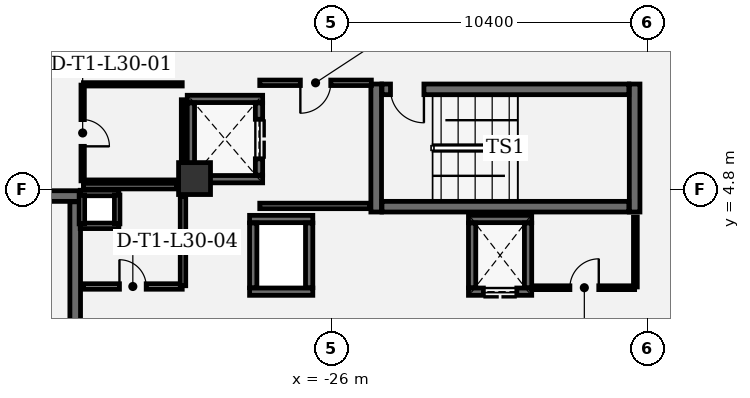
"""IFC4 building model, lengths in metres.
Left out: names, types, materials, properties, quantities, classifications, styles, units other than length and angle.
Written with IfcOpenShell. Run it as: python <this file> out.ifc"""

import sys

from ifc_helpers import new_model, si_unit, direction, frame, frame_2d, origin, origin_2d, place, context, subcontext, project, spatial, rectangle, extrude, element, fill, save


model = new_model("IFC4")
c1 = context("Model", 3, precision=1e-05, world=origin(), true_north=direction((0.0, 1.0)))
c2 = subcontext(c1, "Body", "Model", "MODEL_VIEW")
j1 = project(units=[si_unit("LENGTHUNIT", "METRE"), si_unit("PLANEANGLEUNIT", "RADIAN")], contexts=[c1])
p1 = place(None, origin())
s1 = spatial("IfcSite", under=j1, at=p1, CompositionType="ELEMENT")
p2 = place(p1, origin())
s2 = spatial("IfcBuilding", under=s1, at=p2, CompositionType="ELEMENT")
p3 = place(p2, frame((0.0, 0.0, 134.1)))
s3 = spatial("IfcBuildingStorey", under=s2, at=p3, CompositionType="ELEMENT", Elevation=134.1)
p4 = place(p3, frame((-30.5, 5.15, 0.0), z_axis=(0.0, 0.0, 1.0), x_axis=(1.0, 0.0, 0.0)))
e1 = element("IfcColumn", 1, at=p4, inside=s3, PredefinedType="COLUMN", context=c2, shape_type="SweptSolid", body=[
    extrude(rectangle(XDim=1.05, YDim=1.05, at=origin_2d()), origin(), (0.0, 0.0, 1.0), 4.05),
])
for number, where, z_axis, x_axis in (
    (2, (-24.525, 8.26, 0.0), (0.0, 0.0, 1.0), (0.0, -1.0, 0.0)),
    (3, (-16.025, 4.05, 0.0), (0.0, 0.0, 1.0), (0.0, 1.0, 0.0)),
):
    element("IfcWall", number, at=place(p3, frame(where, z_axis=z_axis, x_axis=x_axis)), inside=s3, PredefinedType="SHEAR", context=c2, shape_type="SweptSolid", body=[
        extrude(rectangle(XDim=4.21, YDim=0.35, at=frame_2d((2.105, 0.0))), origin(), (0.0, 0.0, 1.0), 3.78),
    ])
p5 = place(p3, frame((-24.335, 4.225, 0.0), z_axis=(0.0, 0.0, 1.0), x_axis=(1.0, 0.0, 0.0)))
e4 = element("IfcWall", 4, at=p5, inside=s3, PredefinedType="SHEAR", context=c2, shape_type="SweptSolid", body=[
    extrude(rectangle(XDim=8.12, YDim=0.35, at=frame_2d((4.06, 0.0))), origin(), (0.0, 0.0, 1.0), 3.78),
])
p6 = place(p3, frame((-16.215, 8.085, 0.0), z_axis=(0.0, 0.0, 1.0), x_axis=(-1.0, 0.0, 0.0)))
e5 = element("IfcWall", 5, at=p6, inside=s3, PredefinedType="SHEAR", context=c2, shape_type="SweptSolid", body=[
    extrude(rectangle(XDim=8.12, YDim=0.35, at=frame_2d((4.06, 0.0))), origin(), (0.0, 0.0, 1.0), 3.78),
])
p7 = place(p6, frame((6.74, 0.0, 0.0)))
e6 = element("IfcOpeningElement", 6, at=p7, cuts=e5, PredefinedType="OPENING", context=c2, shape_type="SweptSolid", body=[
    extrude(rectangle(XDim=1.1, YDim=2.2, at=frame_2d((0.55, 1.1))), frame((0.0, 0.185, 0.0), z_axis=(0.0, -1.0, 0.0), x_axis=(1.0, 0.0, 0.0)), (0.0, 0.0, 1.0), 0.37),
])
p8 = place(p3, frame((-34.25, 4.575, 0.0), z_axis=(0.0, 0.0, 1.0), x_axis=(-1.0, 0.0, 0.0)))
e7 = element("IfcWall", 7, at=p8, inside=s3, PredefinedType="SHEAR", context=c2, shape_type="SweptSolid", body=[
    extrude(rectangle(XDim=4.21, YDim=0.35, at=frame_2d((2.105, 0.0))), origin(), (0.0, 0.0, 1.0), 3.78),
])
p9 = place(p3, frame((-34.425, -4.385, 0.0), z_axis=(0.0, 0.0, 1.0), x_axis=(0.0, 1.0, 0.0)))
e8 = element("IfcWall", 8, at=p9, inside=s3, PredefinedType="SHEAR", context=c2, shape_type="SweptSolid", body=[
    extrude(rectangle(XDim=8.77, YDim=0.35, at=frame_2d((4.385, 0.0))), origin(), (0.0, 0.0, 1.0), 3.78),
])
for number, where, z_axis, x_axis in (
    (9, (-28.26, 5.13, 0.0), (0.0, 0.0, 1.0), (-1.0, 0.0, 0.0)),
    (10, (-30.74, 7.77, 0.0), (0.0, 0.0, 1.0), (1.0, 0.0, 0.0)),
):
    element("IfcWall", number, at=place(p3, frame(where, z_axis=z_axis, x_axis=x_axis)), inside=s3, PredefinedType="SHEAR", context=c2, shape_type="SweptSolid", body=[
        extrude(rectangle(XDim=2.48, YDim=0.24, at=frame_2d((1.24, 0.0))), origin(), (0.0, 0.0, 1.0), 3.78),
    ])
p10 = place(p3, frame((-30.62, 5.262, 0.0), z_axis=(0.0, 0.0, 1.0), x_axis=(0.0, 1.0, 0.0)))
e11 = element("IfcWall", 11, at=p10, inside=s3, PredefinedType="SHEAR", context=c2, shape_type="SweptSolid", body=[
    extrude(rectangle(XDim=2.376, YDim=0.24, at=frame_2d((1.188, 0.0))), origin(), (0.0, 0.0, 1.0), 3.78),
])
p11 = place(p3, frame((-28.38, 7.638, 0.0), z_axis=(0.0, 0.0, 1.0), x_axis=(0.0, -1.0, 0.0)))
e12 = element("IfcWall", 12, at=p11, inside=s3, PredefinedType="SHEAR", context=c2, shape_type="SweptSolid", body=[
    extrude(rectangle(XDim=2.376, YDim=0.24, at=frame_2d((1.188, 0.0))), origin(), (0.0, 0.0, 1.0), 3.78),
])
p12 = place(p11, frame((0.538, 0.0, 0.0)))
e13 = element("IfcOpeningElement", 13, at=p12, cuts=e12, PredefinedType="OPENING", context=c2, shape_type="SweptSolid", body=[
    extrude(rectangle(XDim=1.3, YDim=2.3, at=frame_2d((0.65, 1.15))), frame((0.0, 0.13, 0.0), z_axis=(0.0, -1.0, 0.0), x_axis=(1.0, 0.0, 0.0)), (0.0, 0.0, 1.0), 0.26),
])
for number, where, z_axis, x_axis in (
    (14, (-26.61, 1.43, 0.0), (0.0, 0.0, 1.0), (-1.0, 0.0, 0.0)),
    (15, (-28.69, 3.82, 0.0), (0.0, 0.0, 1.0), (1.0, 0.0, 0.0)),
):
    element("IfcWall", number, at=place(p3, frame(where, z_axis=z_axis, x_axis=x_axis)), inside=s3, PredefinedType="SHEAR", context=c2, shape_type="SweptSolid", body=[
        extrude(rectangle(XDim=2.08, YDim=0.24, at=frame_2d((1.04, 0.0))), origin(), (0.0, 0.0, 1.0), 3.78),
    ])
for number, where, z_axis, x_axis in (
    (16, (-28.57, 1.562, 0.0), (0.0, 0.0, 1.0), (0.0, 1.0, 0.0)),
    (17, (-26.73, 3.688, 0.0), (0.0, 0.0, 1.0), (0.0, -1.0, 0.0)),
):
    element("IfcWall", number, at=place(p3, frame(where, z_axis=z_axis, x_axis=x_axis)), inside=s3, PredefinedType="SHEAR", context=c2, shape_type="SweptSolid", body=[
        extrude(rectangle(XDim=2.126, YDim=0.24, at=frame_2d((1.063, 0.0))), origin(), (0.0, 0.0, 1.0), 3.78),
    ])
p13 = place(p3, frame((-19.41, 1.43, 0.0), z_axis=(0.0, 0.0, 1.0), x_axis=(-1.0, 0.0, 0.0)))
e18 = element("IfcWall", 18, at=p13, inside=s3, PredefinedType="SHEAR", context=c2, shape_type="SweptSolid", body=[
    extrude(rectangle(XDim=2.08, YDim=0.24, at=frame_2d((1.04, 0.0))), origin(), (0.0, 0.0, 1.0), 3.78),
])
p14 = place(p13, frame((0.49, 0.0, 0.0)))
e19 = element("IfcOpeningElement", 19, at=p14, cuts=e18, PredefinedType="OPENING", context=c2, shape_type="SweptSolid", body=[
    extrude(rectangle(XDim=1.1, YDim=2.2, at=frame_2d((0.55, 1.1))), frame((0.0, 0.13, 0.0), z_axis=(0.0, -1.0, 0.0), x_axis=(1.0, 0.0, 0.0)), (0.0, 0.0, 1.0), 0.26),
])
p15 = place(p3, frame((-21.49, 3.82, 0.0), z_axis=(0.0, 0.0, 1.0), x_axis=(1.0, 0.0, 0.0)))
e20 = element("IfcWall", 20, at=p15, inside=s3, PredefinedType="SHEAR", context=c2, shape_type="SweptSolid", body=[
    extrude(rectangle(XDim=2.08, YDim=0.24, at=frame_2d((1.04, 0.0))), origin(), (0.0, 0.0, 1.0), 3.78),
])
for number, where, z_axis, x_axis in (
    (21, (-21.37, 1.562, 0.0), (0.0, 0.0, 1.0), (0.0, 1.0, 0.0)),
    (22, (-19.53, 3.688, 0.0), (0.0, 0.0, 1.0), (0.0, -1.0, 0.0)),
):
    element("IfcWall", number, at=place(p3, frame(where, z_axis=z_axis, x_axis=x_axis)), inside=s3, PredefinedType="SHEAR", context=c2, shape_type="SweptSolid", body=[
        extrude(rectangle(XDim=2.126, YDim=0.24, at=frame_2d((1.063, 0.0))), origin(), (0.0, 0.0, 1.0), 3.78),
    ])
for number, where, z_axis, x_axis in (
    (23, (-32.99, 3.595, 0.0), (0.0, 0.0, 1.0), (-1.0, 0.0, 0.0)),
    (24, (-34.26, 4.675, 0.0), (0.0, 0.0, 1.0), (1.0, 0.0, 0.0)),
):
    element("IfcWall", number, at=place(p3, frame(where, z_axis=z_axis, x_axis=x_axis)), inside=s3, PredefinedType="PARTITIONING", context=c2, shape_type="SweptSolid", body=[
        extrude(rectangle(XDim=1.27, YDim=0.18, at=frame_2d((0.635, 0.0))), origin(), (0.0, 0.0, 1.0), 3.78),
    ])
for number, where, z_axis, x_axis in (
    (25, (-34.205, 3.66, 0.0), (0.0, 0.0, 1.0), (0.0, 1.0, 0.0)),
    (26, (-33.045, 4.61, 0.0), (0.0, 0.0, 1.0), (0.0, -1.0, 0.0)),
):
    element("IfcWall", number, at=place(p3, frame(where, z_axis=z_axis, x_axis=x_axis)), inside=s3, PredefinedType="PARTITIONING", context=c2, shape_type="SweptSolid", body=[
        extrude(rectangle(XDim=0.95, YDim=0.18, at=frame_2d((0.475, 0.0))), origin(), (0.0, 0.0, 1.0), 3.78),
    ])
p16 = place(p3, frame((-28.355, 4.25, 0.0), z_axis=(0.0, 0.0, 1.0), x_axis=(1.0, 0.0, 0.0)))
e27 = element("IfcWall", 27, at=p16, inside=s3, PredefinedType="PARTITIONING", context=c2, shape_type="SweptSolid", body=[
    extrude(rectangle(XDim=3.622, YDim=0.18, at=frame_2d((1.811, 0.0))), origin(), (0.0, 0.0, 1.0), 3.78),
])
p17 = place(p3, frame((-24.684, 8.3, 0.0), z_axis=(0.0, 0.0, 1.0), x_axis=(-1.0, 0.0, 0.0)))
e28 = element("IfcWall", 28, at=p17, inside=s3, PredefinedType="PARTITIONING", context=c2, shape_type="SweptSolid", body=[
    extrude(rectangle(XDim=3.671, YDim=0.18, at=frame_2d((1.835, 0.0))), origin(), (0.0, 0.0, 1.0), 3.78),
])
p18 = place(p17, frame((1.335, 0.0, 0.0)))
e29 = element("IfcOpeningElement", 29, at=p18, cuts=e28, PredefinedType="OPENING", context=c2, shape_type="SweptSolid", body=[
    extrude(rectangle(XDim=1.0, YDim=2.15, at=frame_2d((0.5, 1.075))), frame((0.0, 0.1, 0.0), z_axis=(0.0, -1.0, 0.0), x_axis=(1.0, 0.0, 0.0)), (0.0, 0.0, 1.0), 0.2),
])
p19 = place(p3, frame((-34.18, 8.225, 0.0), z_axis=(0.0, 0.0, 1.0), x_axis=(0.0, -1.0, 0.0)))
e30 = element("IfcWall", 30, at=p19, inside=s3, PredefinedType="PARTITIONING", context=c2, shape_type="SweptSolid", body=[
    extrude(rectangle(XDim=3.15, YDim=0.11, at=frame_2d((1.575, 0.0))), origin(), (0.0, 0.0, 1.0), 3.78),
])
p20 = place(p19, frame((1.135, 0.0, 0.0)))
e31 = element("IfcOpeningElement", 31, at=p20, cuts=e30, PredefinedType="OPENING", context=c2, shape_type="SweptSolid", body=[
    extrude(rectangle(XDim=0.88, YDim=2.1, at=frame_2d((0.44, 1.05))), frame((0.0, 0.065, 0.0), z_axis=(0.0, -1.0, 0.0), x_axis=(1.0, 0.0, 0.0)), (0.0, 0.0, 1.0), 0.13),
])
p21 = place(p3, frame((-34.155, 5.05, 0.0), z_axis=(0.0, 0.0, 1.0), x_axis=(1.0, 0.0, 0.0)))
e32 = element("IfcWall", 32, at=p21, inside=s3, PredefinedType="PARTITIONING", context=c2, shape_type="SweptSolid", body=[
    extrude(rectangle(XDim=3.065, YDim=0.11, at=frame_2d((1.532, 0.0))), origin(), (0.0, 0.0, 1.0), 3.78),
])
p22 = place(p3, frame((-30.88, 5.74, 0.0), z_axis=(0.0, 0.0, 1.0), x_axis=(0.0, 1.0, 0.0)))
e33 = element("IfcWall", 33, at=p22, inside=s3, PredefinedType="PARTITIONING", context=c2, shape_type="SweptSolid", body=[
    extrude(rectangle(XDim=2.003, YDim=0.11, at=frame_2d((1.001, 0.0))), origin(), (0.0, 0.0, 1.0), 3.78),
])
p23 = place(p3, frame((-30.905, 8.25, 0.0), z_axis=(0.0, 0.0, 1.0), x_axis=(-1.0, 0.0, 0.0)))
e34 = element("IfcWall", 34, at=p23, inside=s3, PredefinedType="PARTITIONING", context=c2, shape_type="SweptSolid", body=[
    extrude(rectangle(XDim=3.25, YDim=0.11, at=frame_2d((1.625, 0.0))), origin(), (0.0, 0.0, 1.0), 3.78),
])
p24 = place(p3, frame((-19.334, 1.56, 0.0), z_axis=(0.0, 0.0, 1.0), x_axis=(1.0, 0.0, 0.0)))
e35 = element("IfcWall", 35, at=p24, inside=s3, PredefinedType="PARTITIONING", context=c2, shape_type="SweptSolid", body=[
    extrude(rectangle(XDim=3.309, YDim=0.125, at=frame_2d((1.654, 0.0))), origin(), (0.0, 0.0, 1.0), 3.78),
])
p25 = place(p24, frame((1.179, 0.0, 0.0)))
e36 = element("IfcOpeningElement", 36, at=p25, cuts=e35, PredefinedType="OPENING", context=c2, shape_type="SweptSolid", body=[
    extrude(rectangle(XDim=0.95, YDim=2.15, at=frame_2d((0.475, 1.075))), frame((0.0, 0.073, 0.0), z_axis=(0.0, -1.0, 0.0), x_axis=(1.0, 0.0, 0.0)), (0.0, 0.0, 1.0), 0.145),
])
p26 = place(p3, frame((-16.0, 1.585, 0.0), z_axis=(0.0, 0.0, 1.0), x_axis=(0.0, 1.0, 0.0)))
e37 = element("IfcWall", 37, at=p26, inside=s3, PredefinedType="PARTITIONING", context=c2, shape_type="SweptSolid", body=[
    extrude(rectangle(XDim=2.302, YDim=0.125, at=frame_2d((1.151, 0.0))), origin(), (0.0, 0.0, 1.0), 3.78),
])
p27 = place(p3, frame((-34.155, 1.6, 0.0), z_axis=(0.0, 0.0, 1.0), x_axis=(1.0, 0.0, 0.0)))
e38 = element("IfcWall", 38, at=p27, inside=s3, PredefinedType="PARTITIONING", context=c2, shape_type="SweptSolid", body=[
    extrude(rectangle(XDim=3.25, YDim=0.18, at=frame_2d((1.625, 0.0))), origin(), (0.0, 0.0, 1.0), 3.78),
])
p28 = place(p27, frame((1.185, 0.0, 0.0)))
e39 = element("IfcOpeningElement", 39, at=p28, cuts=e38, PredefinedType="OPENING", context=c2, shape_type="SweptSolid", body=[
    extrude(rectangle(XDim=0.88, YDim=2.1, at=frame_2d((0.44, 1.05))), frame((0.0, 0.1, 0.0), z_axis=(0.0, -1.0, 0.0), x_axis=(1.0, 0.0, 0.0)), (0.0, 0.0, 1.0), 0.2),
])
p29 = place(p3, frame((-30.88, 1.625, 0.0), z_axis=(0.0, 0.0, 1.0), x_axis=(0.0, 1.0, 0.0)))
e40 = element("IfcWall", 40, at=p29, inside=s3, PredefinedType="PARTITIONING", context=c2, shape_type="SweptSolid", body=[
    extrude(rectangle(XDim=2.935, YDim=0.18, at=frame_2d((1.468, 0.0))), origin(), (0.0, 0.0, 1.0), 3.78),
])
p30 = place(p3, frame((-31.09, 4.9, 0.0), z_axis=(0.0, 0.0, 1.0), x_axis=(-1.0, 0.0, 0.0)))
e41 = element("IfcWall", 41, at=p30, inside=s3, PredefinedType="PARTITIONING", context=c2, shape_type="SweptSolid", body=[
    extrude(rectangle(XDim=3.065, YDim=0.18, at=frame_2d((1.532, 0.0))), origin(), (0.0, 0.0, 1.0), 3.78),
])
p31 = place(p7, origin())
e42 = element("IfcDoor", 42, at=p31, inside=s3, OperationType="SINGLE_SWING_LEFT", PredefinedType="DOOR", context=c2, shape_type="SweptSolid", body=[
    extrude(rectangle(XDim=1.1, YDim=2.2, at=frame_2d((0.55, 1.1))), frame((0.0, 0.025, 0.0), z_axis=(0.0, -1.0, 0.0), x_axis=(1.0, 0.0, 0.0)), (0.0, 0.0, 1.0), 0.05),
])
fill(e6, e42)
p32 = place(p12, origin())
e43 = element("IfcDoor", 43, at=p32, inside=s3, OperationType="DOUBLE_DOOR_SLIDING", PredefinedType="DOOR", context=c2, shape_type="SweptSolid", body=[
    extrude(rectangle(XDim=1.3, YDim=2.3, at=frame_2d((0.65, 1.15))), frame((0.0, 0.025, 0.0), z_axis=(0.0, -1.0, 0.0), x_axis=(1.0, 0.0, 0.0)), (0.0, 0.0, 1.0), 0.05),
])
fill(e13, e43)
p33 = place(p14, origin())
e44 = element("IfcDoor", 44, at=p33, inside=s3, OperationType="DOUBLE_DOOR_SLIDING", PredefinedType="DOOR", context=c2, shape_type="SweptSolid", body=[
    extrude(rectangle(XDim=1.1, YDim=2.2, at=frame_2d((0.55, 1.1))), frame((0.0, 0.025, 0.0), z_axis=(0.0, -1.0, 0.0), x_axis=(1.0, 0.0, 0.0)), (0.0, 0.0, 1.0), 0.05),
])
fill(e19, e44)
p34 = place(p20, origin())
e45 = element("IfcDoor", 45, at=p34, inside=s3, OperationType="SINGLE_SWING_RIGHT", PredefinedType="DOOR", context=c2, shape_type="SweptSolid", body=[
    extrude(rectangle(XDim=0.88, YDim=2.1, at=frame_2d((0.44, 1.05))), frame((0.0, 0.025, 0.0), z_axis=(0.0, -1.0, 0.0), x_axis=(1.0, 0.0, 0.0)), (0.0, 0.0, 1.0), 0.05),
])
fill(e31, e45)
p35 = place(p25, origin())
e46 = element("IfcDoor", 46, at=p35, inside=s3, OperationType="SINGLE_SWING_RIGHT", PredefinedType="DOOR", context=c2, shape_type="SweptSolid", body=[
    extrude(rectangle(XDim=0.95, YDim=2.15, at=frame_2d((0.475, 1.075))), frame((0.0, 0.025, 0.0), z_axis=(0.0, -1.0, 0.0), x_axis=(1.0, 0.0, 0.0)), (0.0, 0.0, 1.0), 0.05),
])
fill(e36, e46)
p36 = place(p28, origin())
e47 = element("IfcDoor", 47, at=p36, inside=s3, OperationType="SINGLE_SWING_LEFT", PredefinedType="DOOR", context=c2, shape_type="SweptSolid", body=[
    extrude(rectangle(XDim=0.88, YDim=2.1, at=frame_2d((0.44, 1.05))), frame((0.0, 0.025, 0.0), z_axis=(0.0, -1.0, 0.0), x_axis=(1.0, 0.0, 0.0)), (0.0, 0.0, 1.0), 0.05),
])
fill(e39, e47)
p37 = place(p18, origin())
e48 = element("IfcDoor", 48, at=p37, inside=s3, OperationType="SINGLE_SWING_RIGHT", PredefinedType="DOOR", context=c2, shape_type="SweptSolid", body=[
    extrude(rectangle(XDim=1.0, YDim=2.15, at=frame_2d((0.5, 1.075))), frame((0.0, 0.025, 0.0), z_axis=(0.0, -1.0, 0.0), x_axis=(1.0, 0.0, 0.0)), (0.0, 0.0, 1.0), 0.05),
])
fill(e29, e48)
save(model, sys.argv[1])
